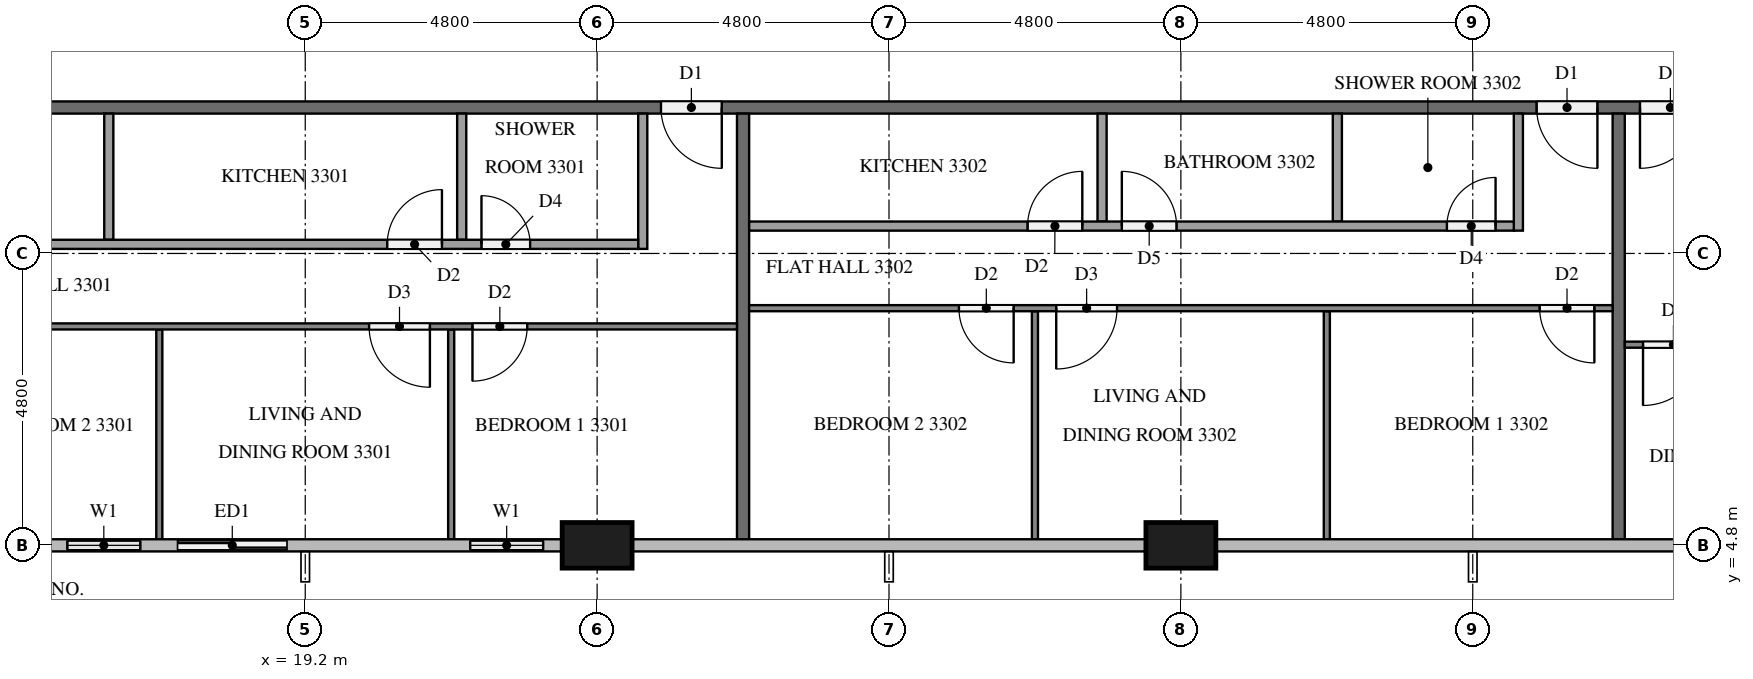
"""IFC4 building model, lengths in metres.
Left out: names, types, materials, properties, quantities, classifications, styles, units other than length and angle.
Written with IfcOpenShell. Run it as: python <this file> out.ifc"""

import sys

from ifc_helpers import new_model, si_unit, direction, frame, frame_2d, origin, origin_2d, place, context, subcontext, project, spatial, rectangle, extrude, element, fill, save


model = new_model("IFC4")
c1 = context("Model", 3, precision=1e-05, world=origin(), true_north=direction((0.0, 1.0)))
c2 = subcontext(c1, "Body", "Model", "MODEL_VIEW")
j1 = project(units=[si_unit("LENGTHUNIT", "METRE"), si_unit("PLANEANGLEUNIT", "RADIAN")], contexts=[c1])
p1 = place(None, origin())
s1 = spatial("IfcSite", under=j1, at=p1, CompositionType="ELEMENT")
p2 = place(p1, origin())
s2 = spatial("IfcBuilding", under=s1, at=p2, CompositionType="ELEMENT")
p3 = place(p2, frame((0.0, 0.0, 129.6)))
s3 = spatial("IfcBuildingStorey", under=s2, at=p3, CompositionType="ELEMENT", Elevation=129.6)
for number, where, z_axis, x_axis in (
    (1, (24.0, 4.8, 0.0), (0.0, 0.0, 1.0), (1.0, 0.0, 0.0)),
    (2, (33.6, 4.8, 0.0), (0.0, 0.0, 1.0), (1.0, 0.0, 0.0)),
):
    element("IfcColumn", number, at=place(p3, frame(where, z_axis=z_axis, x_axis=x_axis)), inside=s3, PredefinedType="COLUMN", context=c2, shape_type="SweptSolid", body=[
        extrude(rectangle(XDim=1.15, YDim=0.75, at=origin_2d()), origin(), (0.0, 0.0, 1.0), 3.2),
    ])
p4 = place(p3, frame((14.975, 4.8, 0.0), z_axis=(0.0, 0.0, 1.0), x_axis=(1.0, 0.0, 0.0)))
e3 = element("IfcWall", 3, at=p4, inside=s3, PredefinedType="SOLIDWALL", context=c2, shape_type="SweptSolid", body=[
    extrude(rectangle(XDim=4.225, YDim=0.15, at=frame_2d((2.112, 0.0))), origin(), (0.0, 0.0, 1.0), 3.2),
])
p5 = place(p4, frame((0.312, 0.0, 0.9)))
e4 = element("IfcOpeningElement", 4, at=p5, cuts=e3, PredefinedType="OPENING", context=c2, shape_type="SweptSolid", body=[
    extrude(rectangle(XDim=1.2, YDim=1.4, at=frame_2d((0.6, 0.7))), frame((0.0, 0.085, 0.0), z_axis=(0.0, -1.0, 0.0), x_axis=(1.0, 0.0, 0.0)), (0.0, 0.0, 1.0), 0.17),
])
p6 = place(p4, frame((2.125, 0.0, 0.0)))
e5 = element("IfcOpeningElement", 5, at=p6, cuts=e3, PredefinedType="OPENING", context=c2, shape_type="SweptSolid", body=[
    extrude(rectangle(XDim=1.8, YDim=2.4, at=frame_2d((0.9, 1.2))), frame((0.0, 0.085, 0.0), z_axis=(0.0, -1.0, 0.0), x_axis=(1.0, 0.0, 0.0)), (0.0, 0.0, 1.0), 0.17),
])
p7 = place(p3, frame((21.6, 4.8, 0.0), z_axis=(0.0, 0.0, 1.0), x_axis=(1.0, 0.0, 0.0)))
e6 = element("IfcWall", 6, at=p7, inside=s3, PredefinedType="SOLIDWALL", context=c2, shape_type="SweptSolid", body=[
    extrude(rectangle(XDim=1.825, YDim=0.15, at=frame_2d((0.913, 0.0))), origin(), (0.0, 0.0, 1.0), 3.2),
])
p8 = place(p7, frame((0.312, 0.0, 0.9)))
e7 = element("IfcOpeningElement", 7, at=p8, cuts=e6, PredefinedType="OPENING", context=c2, shape_type="SweptSolid", body=[
    extrude(rectangle(XDim=1.2, YDim=1.4, at=frame_2d((0.6, 0.7))), frame((0.0, 0.085, 0.0), z_axis=(0.0, -1.0, 0.0), x_axis=(1.0, 0.0, 0.0)), (0.0, 0.0, 1.0), 0.17),
])
p9 = place(p3, frame((50.5, 12.0, 0.0), z_axis=(0.0, 0.0, 1.0), x_axis=(-1.0, 0.0, 0.0)))
e8 = element("IfcWall", 8, at=p9, inside=s3, PredefinedType="PARTITIONING", context=c2, shape_type="SweptSolid", body=[
    extrude(rectangle(XDim=38.6, YDim=0.2, at=frame_2d((19.3, 0.0))), origin(), (0.0, 0.0, 1.0), 3.2),
])
p10 = place(p9, frame((24.45, 0.0, 0.0)))
e9 = element("IfcOpeningElement", 9, at=p10, cuts=e8, PredefinedType="OPENING", context=c2, shape_type="SweptSolid", body=[
    extrude(rectangle(XDim=1.0, YDim=2.1, at=frame_2d((0.5, 1.05))), frame((0.0, 0.11, 0.0), z_axis=(0.0, -1.0, 0.0), x_axis=(1.0, 0.0, 0.0)), (0.0, 0.0, 1.0), 0.22),
])
p11 = place(p9, frame((10.05, 0.0, 0.0)))
e10 = element("IfcOpeningElement", 10, at=p11, cuts=e8, PredefinedType="OPENING", context=c2, shape_type="SweptSolid", body=[
    extrude(rectangle(XDim=1.0, YDim=2.1, at=frame_2d((0.5, 1.05))), frame((0.0, 0.11, 0.0), z_axis=(0.0, -1.0, 0.0), x_axis=(1.0, 0.0, 0.0)), (0.0, 0.0, 1.0), 0.22),
])
p12 = place(p9, frame((8.35, 0.0, 0.0)))
e11 = element("IfcOpeningElement", 11, at=p12, cuts=e8, PredefinedType="OPENING", context=c2, shape_type="SweptSolid", body=[
    extrude(rectangle(XDim=1.0, YDim=2.1, at=frame_2d((0.5, 1.05))), frame((0.0, 0.11, 0.0), z_axis=(0.0, -1.0, 0.0), x_axis=(1.0, 0.0, 0.0)), (0.0, 0.0, 1.0), 0.22),
])
for number, where, z_axis, x_axis in (
    (12, (26.4, 11.9, 0.0), (0.0, 0.0, 1.0), (0.0, -1.0, 0.0)),
    (13, (40.8, 11.9, 0.0), (0.0, 0.0, 1.0), (0.0, -1.0, 0.0)),
):
    element("IfcWall", number, at=place(p3, frame(where, z_axis=z_axis, x_axis=x_axis)), inside=s3, PredefinedType="PARTITIONING", context=c2, shape_type="SweptSolid", body=[
        extrude(rectangle(XDim=7.0, YDim=0.2, at=frame_2d((3.5, 0.0))), origin(), (0.0, 0.0, 1.0), 3.2),
    ])
for number, where, z_axis, x_axis in (
    (14, (21.6, 8.35, 0.0), (0.0, 0.0, 1.0), (0.0, -1.0, 0.0)),
    (15, (16.8, 8.35, 0.0), (0.0, 0.0, 1.0), (0.0, -1.0, 0.0)),
):
    element("IfcWall", number, at=place(p3, frame(where, z_axis=z_axis, x_axis=x_axis)), inside=s3, PredefinedType="PARTITIONING", context=c2, shape_type="SweptSolid", body=[
        extrude(rectangle(XDim=3.45, YDim=0.1, at=frame_2d((1.725, 0.0))), origin(), (0.0, 0.0, 1.0), 3.2),
    ])
p13 = place(p3, frame((26.3, 8.4, 0.0), z_axis=(0.0, 0.0, 1.0), x_axis=(-1.0, 0.0, 0.0)))
e16 = element("IfcWall", 16, at=p13, inside=s3, PredefinedType="PARTITIONING", context=c2, shape_type="SweptSolid", body=[
    extrude(rectangle(XDim=14.2, YDim=0.1, at=frame_2d((7.1, 0.0))), origin(), (0.0, 0.0, 1.0), 3.2),
])
p14 = place(p13, frame((3.45, 0.0, 0.0)))
e17 = element("IfcOpeningElement", 17, at=p14, cuts=e16, PredefinedType="OPENING", context=c2, shape_type="SweptSolid", body=[
    extrude(rectangle(XDim=0.9, YDim=2.1, at=frame_2d((0.45, 1.05))), frame((0.0, 0.06, 0.0), z_axis=(0.0, -1.0, 0.0), x_axis=(1.0, 0.0, 0.0)), (0.0, 0.0, 1.0), 0.12),
])
p15 = place(p13, frame((5.05, 0.0, 0.0)))
e18 = element("IfcOpeningElement", 18, at=p15, cuts=e16, PredefinedType="OPENING", context=c2, shape_type="SweptSolid", body=[
    extrude(rectangle(XDim=1.0, YDim=2.1, at=frame_2d((0.5, 1.05))), frame((0.0, 0.06, 0.0), z_axis=(0.0, -1.0, 0.0), x_axis=(1.0, 0.0, 0.0)), (0.0, 0.0, 1.0), 0.12),
])
p16 = place(p13, frame((13.0, 0.0, 0.0)))
e19 = element("IfcOpeningElement", 19, at=p16, cuts=e16, PredefinedType="OPENING", context=c2, shape_type="SweptSolid", body=[
    extrude(rectangle(XDim=0.9, YDim=2.1, at=frame_2d((0.45, 1.05))), frame((0.0, 0.06, 0.0), z_axis=(0.0, -1.0, 0.0), x_axis=(1.0, 0.0, 0.0)), (0.0, 0.0, 1.0), 0.12),
])
for number, where, z_axis, x_axis in (
    (20, (21.773, 11.9, 0.0), (0.0, 0.0, 1.0), (0.0, -1.0, 0.0)),
    (21, (15.969, 11.9, 0.0), (0.0, 0.0, 1.0), (0.0, -1.0, 0.0)),
):
    element("IfcWall", number, at=place(p3, frame(where, z_axis=z_axis, x_axis=x_axis)), inside=s3, PredefinedType="PARTITIONING", context=c2, shape_type="SweptSolid", body=[
        extrude(rectangle(XDim=2.075, YDim=0.15, at=frame_2d((1.038, 0.0))), origin(), (0.0, 0.0, 1.0), 3.2),
    ])
p17 = place(p3, frame((24.75, 11.9, 0.0), z_axis=(0.0, 0.0, 1.0), x_axis=(0.0, -1.0, 0.0)))
e22 = element("IfcWall", 22, at=p17, inside=s3, PredefinedType="PARTITIONING", context=c2, shape_type="SweptSolid", body=[
    extrude(rectangle(XDim=2.225, YDim=0.15, at=frame_2d((1.112, 0.0))), origin(), (0.0, 0.0, 1.0), 3.2),
])
p18 = place(p3, frame((12.1, 9.75, 0.0), z_axis=(0.0, 0.0, 1.0), x_axis=(1.0, 0.0, 0.0)))
e23 = element("IfcWall", 23, at=p18, inside=s3, PredefinedType="PARTITIONING", context=c2, shape_type="SweptSolid", body=[
    extrude(rectangle(XDim=12.575, YDim=0.15, at=frame_2d((6.288, 0.0))), origin(), (0.0, 0.0, 1.0), 3.2),
])
p19 = place(p18, frame((9.998, 0.0, 0.0)))
e24 = element("IfcOpeningElement", 24, at=p19, cuts=e23, PredefinedType="OPENING", context=c2, shape_type="SweptSolid", body=[
    extrude(rectangle(XDim=0.8, YDim=2.1, at=frame_2d((0.4, 1.05))), frame((0.0, 0.085, 0.0), z_axis=(0.0, -1.0, 0.0), x_axis=(1.0, 0.0, 0.0)), (0.0, 0.0, 1.0), 0.17),
])
p20 = place(p18, frame((8.448, 0.0, 0.0)))
e25 = element("IfcOpeningElement", 25, at=p20, cuts=e23, PredefinedType="OPENING", context=c2, shape_type="SweptSolid", body=[
    extrude(rectangle(XDim=0.9, YDim=2.1, at=frame_2d((0.45, 1.05))), frame((0.0, 0.085, 0.0), z_axis=(0.0, -1.0, 0.0), x_axis=(1.0, 0.0, 0.0)), (0.0, 0.0, 1.0), 0.17),
])
p21 = place(p18, frame((0.35, 0.0, 0.0)))
e26 = element("IfcOpeningElement", 26, at=p21, cuts=e23, PredefinedType="OPENING", context=c2, shape_type="SweptSolid", body=[
    extrude(rectangle(XDim=0.9, YDim=2.1, at=frame_2d((0.45, 1.05))), frame((0.0, 0.085, 0.0), z_axis=(0.0, -1.0, 0.0), x_axis=(1.0, 0.0, 0.0)), (0.0, 0.0, 1.0), 0.17),
])
for number, where, z_axis, x_axis in (
    (27, (36.0, 8.65, 0.0), (0.0, 0.0, 1.0), (0.0, -1.0, 0.0)),
    (28, (31.2, 8.65, 0.0), (0.0, 0.0, 1.0), (0.0, -1.0, 0.0)),
):
    element("IfcWall", number, at=place(p3, frame(where, z_axis=z_axis, x_axis=x_axis)), inside=s3, PredefinedType="PARTITIONING", context=c2, shape_type="SweptSolid", body=[
        extrude(rectangle(XDim=3.75, YDim=0.1, at=frame_2d((1.875, 0.0))), origin(), (0.0, 0.0, 1.0), 3.2),
    ])
p22 = place(p3, frame((40.7, 8.7, 0.0), z_axis=(0.0, 0.0, 1.0), x_axis=(-1.0, 0.0, 0.0)))
e29 = element("IfcWall", 29, at=p22, inside=s3, PredefinedType="PARTITIONING", context=c2, shape_type="SweptSolid", body=[
    extrude(rectangle(XDim=14.2, YDim=0.1, at=frame_2d((7.1, 0.0))), origin(), (0.0, 0.0, 1.0), 3.2),
])
p23 = place(p22, frame((0.3, 0.0, 0.0)))
e30 = element("IfcOpeningElement", 30, at=p23, cuts=e29, PredefinedType="OPENING", context=c2, shape_type="SweptSolid", body=[
    extrude(rectangle(XDim=0.9, YDim=2.1, at=frame_2d((0.45, 1.05))), frame((0.0, 0.06, 0.0), z_axis=(0.0, -1.0, 0.0), x_axis=(1.0, 0.0, 0.0)), (0.0, 0.0, 1.0), 0.12),
])
p24 = place(p22, frame((8.15, 0.0, 0.0)))
e31 = element("IfcOpeningElement", 31, at=p24, cuts=e29, PredefinedType="OPENING", context=c2, shape_type="SweptSolid", body=[
    extrude(rectangle(XDim=1.0, YDim=2.1, at=frame_2d((0.5, 1.05))), frame((0.0, 0.06, 0.0), z_axis=(0.0, -1.0, 0.0), x_axis=(1.0, 0.0, 0.0)), (0.0, 0.0, 1.0), 0.12),
])
p25 = place(p22, frame((9.85, 0.0, 0.0)))
e32 = element("IfcOpeningElement", 32, at=p25, cuts=e29, PredefinedType="OPENING", context=c2, shape_type="SweptSolid", body=[
    extrude(rectangle(XDim=0.9, YDim=2.1, at=frame_2d((0.45, 1.05))), frame((0.0, 0.06, 0.0), z_axis=(0.0, -1.0, 0.0), x_axis=(1.0, 0.0, 0.0)), (0.0, 0.0, 1.0), 0.12),
])
for number, where, z_axis, x_axis in (
    (33, (36.173, 11.9, 0.0), (0.0, 0.0, 1.0), (0.0, -1.0, 0.0)),
    (34, (32.304, 11.9, 0.0), (0.0, 0.0, 1.0), (0.0, -1.0, 0.0)),
):
    element("IfcWall", number, at=place(p3, frame(where, z_axis=z_axis, x_axis=x_axis)), inside=s3, PredefinedType="PARTITIONING", context=c2, shape_type="SweptSolid", body=[
        extrude(rectangle(XDim=1.775, YDim=0.15, at=frame_2d((0.887, 0.0))), origin(), (0.0, 0.0, 1.0), 3.2),
    ])
p26 = place(p3, frame((39.15, 11.9, 0.0), z_axis=(0.0, 0.0, 1.0), x_axis=(0.0, -1.0, 0.0)))
e35 = element("IfcWall", 35, at=p26, inside=s3, PredefinedType="PARTITIONING", context=c2, shape_type="SweptSolid", body=[
    extrude(rectangle(XDim=1.925, YDim=0.15, at=frame_2d((0.962, 0.0))), origin(), (0.0, 0.0, 1.0), 3.2),
])
p27 = place(p3, frame((26.5, 10.05, 0.0), z_axis=(0.0, 0.0, 1.0), x_axis=(1.0, 0.0, 0.0)))
e36 = element("IfcWall", 36, at=p27, inside=s3, PredefinedType="PARTITIONING", context=c2, shape_type="SweptSolid", body=[
    extrude(rectangle(XDim=12.575, YDim=0.15, at=frame_2d((6.288, 0.0))), origin(), (0.0, 0.0, 1.0), 3.2),
])
p28 = place(p27, frame((11.475, 0.0, 0.0)))
e37 = element("IfcOpeningElement", 37, at=p28, cuts=e36, PredefinedType="OPENING", context=c2, shape_type="SweptSolid", body=[
    extrude(rectangle(XDim=0.8, YDim=2.1, at=frame_2d((0.4, 1.05))), frame((0.0, 0.085, 0.0), z_axis=(0.0, -1.0, 0.0), x_axis=(1.0, 0.0, 0.0)), (0.0, 0.0, 1.0), 0.17),
])
p29 = place(p27, frame((6.129, 0.0, 0.0)))
e38 = element("IfcOpeningElement", 38, at=p29, cuts=e36, PredefinedType="OPENING", context=c2, shape_type="SweptSolid", body=[
    extrude(rectangle(XDim=0.9, YDim=2.1, at=frame_2d((0.45, 1.05))), frame((0.0, 0.085, 0.0), z_axis=(0.0, -1.0, 0.0), x_axis=(1.0, 0.0, 0.0)), (0.0, 0.0, 1.0), 0.17),
])
p30 = place(p27, frame((4.579, 0.0, 0.0)))
e39 = element("IfcOpeningElement", 39, at=p30, cuts=e36, PredefinedType="OPENING", context=c2, shape_type="SweptSolid", body=[
    extrude(rectangle(XDim=0.9, YDim=2.1, at=frame_2d((0.45, 1.05))), frame((0.0, 0.085, 0.0), z_axis=(0.0, -1.0, 0.0), x_axis=(1.0, 0.0, 0.0)), (0.0, 0.0, 1.0), 0.17),
])
p31 = place(p3, frame((50.3, 8.1, 0.0), z_axis=(0.0, 0.0, 1.0), x_axis=(-1.0, 0.0, 0.0)))
e40 = element("IfcWall", 40, at=p31, inside=s3, PredefinedType="PARTITIONING", context=c2, shape_type="SweptSolid", body=[
    extrude(rectangle(XDim=9.4, YDim=0.1, at=frame_2d((4.7, 0.0))), origin(), (0.0, 0.0, 1.0), 3.2),
])
p32 = place(p31, frame((8.1, 0.0, 0.0)))
e41 = element("IfcOpeningElement", 41, at=p32, cuts=e40, PredefinedType="OPENING", context=c2, shape_type="SweptSolid", body=[
    extrude(rectangle(XDim=1.0, YDim=2.1, at=frame_2d((0.5, 1.05))), frame((0.0, 0.06, 0.0), z_axis=(0.0, -1.0, 0.0), x_axis=(1.0, 0.0, 0.0)), (0.0, 0.0, 1.0), 0.12),
])
p33 = place(p31, frame((0.3, 0.0, 0.0)))
e42 = element("IfcOpeningElement", 42, at=p33, cuts=e40, PredefinedType="OPENING", context=c2, shape_type="SweptSolid", body=[
    extrude(rectangle(XDim=0.9, YDim=2.1, at=frame_2d((0.45, 1.05))), frame((0.0, 0.06, 0.0), z_axis=(0.0, -1.0, 0.0), x_axis=(1.0, 0.0, 0.0)), (0.0, 0.0, 1.0), 0.12),
])
p34 = place(p5, origin())
e43 = element("IfcWindow", 43, at=p34, inside=s3, PartitioningType="SINGLE_PANEL", PredefinedType="WINDOW", context=c2, shape_type="SweptSolid", body=[
    extrude(rectangle(XDim=1.2, YDim=1.4, at=frame_2d((0.6, 0.7))), frame((0.0, 0.03, 0.0), z_axis=(0.0, -1.0, 0.0), x_axis=(1.0, 0.0, 0.0)), (0.0, 0.0, 1.0), 0.06),
])
fill(e4, e43)
p35 = place(p6, origin())
e44 = element("IfcDoor", 44, at=p35, inside=s3, OperationType="SLIDING_TO_LEFT", PredefinedType="DOOR", context=c2, shape_type="SweptSolid", body=[
    extrude(rectangle(XDim=1.8, YDim=2.4, at=frame_2d((0.9, 1.2))), frame((0.0, 0.025, 0.0), z_axis=(0.0, -1.0, 0.0), x_axis=(1.0, 0.0, 0.0)), (0.0, 0.0, 1.0), 0.05),
])
fill(e5, e44)
p36 = place(p8, origin())
e45 = element("IfcWindow", 45, at=p36, inside=s3, PartitioningType="SINGLE_PANEL", PredefinedType="WINDOW", context=c2, shape_type="SweptSolid", body=[
    extrude(rectangle(XDim=1.2, YDim=1.4, at=frame_2d((0.6, 0.7))), frame((0.0, 0.03, 0.0), z_axis=(0.0, -1.0, 0.0), x_axis=(1.0, 0.0, 0.0)), (0.0, 0.0, 1.0), 0.06),
])
fill(e7, e45)
p37 = place(p10, origin())
e46 = element("IfcDoor", 46, at=p37, inside=s3, OperationType="SINGLE_SWING_LEFT", PredefinedType="DOOR", context=c2, shape_type="SweptSolid", body=[
    extrude(rectangle(XDim=1.0, YDim=2.1, at=frame_2d((0.5, 1.05))), frame((0.0, 0.025, 0.0), z_axis=(0.0, -1.0, 0.0), x_axis=(1.0, 0.0, 0.0)), (0.0, 0.0, 1.0), 0.05),
])
fill(e9, e46)
p38 = place(p11, origin())
e47 = element("IfcDoor", 47, at=p38, inside=s3, OperationType="SINGLE_SWING_LEFT", PredefinedType="DOOR", context=c2, shape_type="SweptSolid", body=[
    extrude(rectangle(XDim=1.0, YDim=2.1, at=frame_2d((0.5, 1.05))), frame((0.0, 0.025, 0.0), z_axis=(0.0, -1.0, 0.0), x_axis=(1.0, 0.0, 0.0)), (0.0, 0.0, 1.0), 0.05),
])
fill(e10, e47)
p39 = place(p12, origin())
e48 = element("IfcDoor", 48, at=p39, inside=s3, OperationType="SINGLE_SWING_RIGHT", PredefinedType="DOOR", context=c2, shape_type="SweptSolid", body=[
    extrude(rectangle(XDim=1.0, YDim=2.1, at=frame_2d((0.5, 1.05))), frame((0.0, 0.025, 0.0), z_axis=(0.0, -1.0, 0.0), x_axis=(1.0, 0.0, 0.0)), (0.0, 0.0, 1.0), 0.05),
])
fill(e11, e48)
p40 = place(p14, origin())
e49 = element("IfcDoor", 49, at=p40, inside=s3, OperationType="SINGLE_SWING_RIGHT", PredefinedType="DOOR", context=c2, shape_type="SweptSolid", body=[
    extrude(rectangle(XDim=0.9, YDim=2.1, at=frame_2d((0.45, 1.05))), frame((0.0, 0.025, 0.0), z_axis=(0.0, -1.0, 0.0), x_axis=(1.0, 0.0, 0.0)), (0.0, 0.0, 1.0), 0.05),
])
fill(e17, e49)
p41 = place(p15, origin())
e50 = element("IfcDoor", 50, at=p41, inside=s3, OperationType="SINGLE_SWING_LEFT", PredefinedType="DOOR", context=c2, shape_type="SweptSolid", body=[
    extrude(rectangle(XDim=1.0, YDim=2.1, at=frame_2d((0.5, 1.05))), frame((0.0, 0.025, 0.0), z_axis=(0.0, -1.0, 0.0), x_axis=(1.0, 0.0, 0.0)), (0.0, 0.0, 1.0), 0.05),
])
fill(e18, e50)
p42 = place(p19, origin())
e51 = element("IfcDoor", 51, at=p42, inside=s3, OperationType="SINGLE_SWING_LEFT", PredefinedType="DOOR", context=c2, shape_type="SweptSolid", body=[
    extrude(rectangle(XDim=0.8, YDim=2.1, at=frame_2d((0.4, 1.05))), frame((0.0, 0.025, 0.0), z_axis=(0.0, -1.0, 0.0), x_axis=(1.0, 0.0, 0.0)), (0.0, 0.0, 1.0), 0.05),
])
fill(e24, e51)
p43 = place(p20, origin())
e52 = element("IfcDoor", 52, at=p43, inside=s3, OperationType="SINGLE_SWING_RIGHT", PredefinedType="DOOR", context=c2, shape_type="SweptSolid", body=[
    extrude(rectangle(XDim=0.9, YDim=2.1, at=frame_2d((0.45, 1.05))), frame((0.0, 0.025, 0.0), z_axis=(0.0, -1.0, 0.0), x_axis=(1.0, 0.0, 0.0)), (0.0, 0.0, 1.0), 0.05),
])
fill(e25, e52)
p44 = place(p23, origin())
e53 = element("IfcDoor", 53, at=p44, inside=s3, OperationType="SINGLE_SWING_LEFT", PredefinedType="DOOR", context=c2, shape_type="SweptSolid", body=[
    extrude(rectangle(XDim=0.9, YDim=2.1, at=frame_2d((0.45, 1.05))), frame((0.0, 0.025, 0.0), z_axis=(0.0, -1.0, 0.0), x_axis=(1.0, 0.0, 0.0)), (0.0, 0.0, 1.0), 0.05),
])
fill(e30, e53)
p45 = place(p24, origin())
e54 = element("IfcDoor", 54, at=p45, inside=s3, OperationType="SINGLE_SWING_RIGHT", PredefinedType="DOOR", context=c2, shape_type="SweptSolid", body=[
    extrude(rectangle(XDim=1.0, YDim=2.1, at=frame_2d((0.5, 1.05))), frame((0.0, 0.025, 0.0), z_axis=(0.0, -1.0, 0.0), x_axis=(1.0, 0.0, 0.0)), (0.0, 0.0, 1.0), 0.05),
])
fill(e31, e54)
p46 = place(p25, origin())
e55 = element("IfcDoor", 55, at=p46, inside=s3, OperationType="SINGLE_SWING_LEFT", PredefinedType="DOOR", context=c2, shape_type="SweptSolid", body=[
    extrude(rectangle(XDim=0.9, YDim=2.1, at=frame_2d((0.45, 1.05))), frame((0.0, 0.025, 0.0), z_axis=(0.0, -1.0, 0.0), x_axis=(1.0, 0.0, 0.0)), (0.0, 0.0, 1.0), 0.05),
])
fill(e32, e55)
p47 = place(p28, origin())
e56 = element("IfcDoor", 56, at=p47, inside=s3, OperationType="SINGLE_SWING_RIGHT", PredefinedType="DOOR", context=c2, shape_type="SweptSolid", body=[
    extrude(rectangle(XDim=0.8, YDim=2.1, at=frame_2d((0.4, 1.05))), frame((0.0, 0.025, 0.0), z_axis=(0.0, -1.0, 0.0), x_axis=(1.0, 0.0, 0.0)), (0.0, 0.0, 1.0), 0.05),
])
fill(e37, e56)
p48 = place(p29, origin())
e57 = element("IfcDoor", 57, at=p48, inside=s3, OperationType="SINGLE_SWING_LEFT", PredefinedType="DOOR", context=c2, shape_type="SweptSolid", body=[
    extrude(rectangle(XDim=0.9, YDim=2.1, at=frame_2d((0.45, 1.05))), frame((0.0, 0.025, 0.0), z_axis=(0.0, -1.0, 0.0), x_axis=(1.0, 0.0, 0.0)), (0.0, 0.0, 1.0), 0.05),
])
fill(e38, e57)
p49 = place(p30, origin())
e58 = element("IfcDoor", 58, at=p49, inside=s3, OperationType="SINGLE_SWING_RIGHT", PredefinedType="DOOR", context=c2, shape_type="SweptSolid", body=[
    extrude(rectangle(XDim=0.9, YDim=2.1, at=frame_2d((0.45, 1.05))), frame((0.0, 0.025, 0.0), z_axis=(0.0, -1.0, 0.0), x_axis=(1.0, 0.0, 0.0)), (0.0, 0.0, 1.0), 0.05),
])
fill(e39, e58)
p50 = place(p32, origin())
e59 = element("IfcDoor", 59, at=p50, inside=s3, OperationType="SINGLE_SWING_RIGHT", PredefinedType="DOOR", context=c2, shape_type="SweptSolid", body=[
    extrude(rectangle(XDim=1.0, YDim=2.1, at=frame_2d((0.5, 1.05))), frame((0.0, 0.025, 0.0), z_axis=(0.0, -1.0, 0.0), x_axis=(1.0, 0.0, 0.0)), (0.0, 0.0, 1.0), 0.05),
])
fill(e41, e59)
save(model, sys.argv[1])
